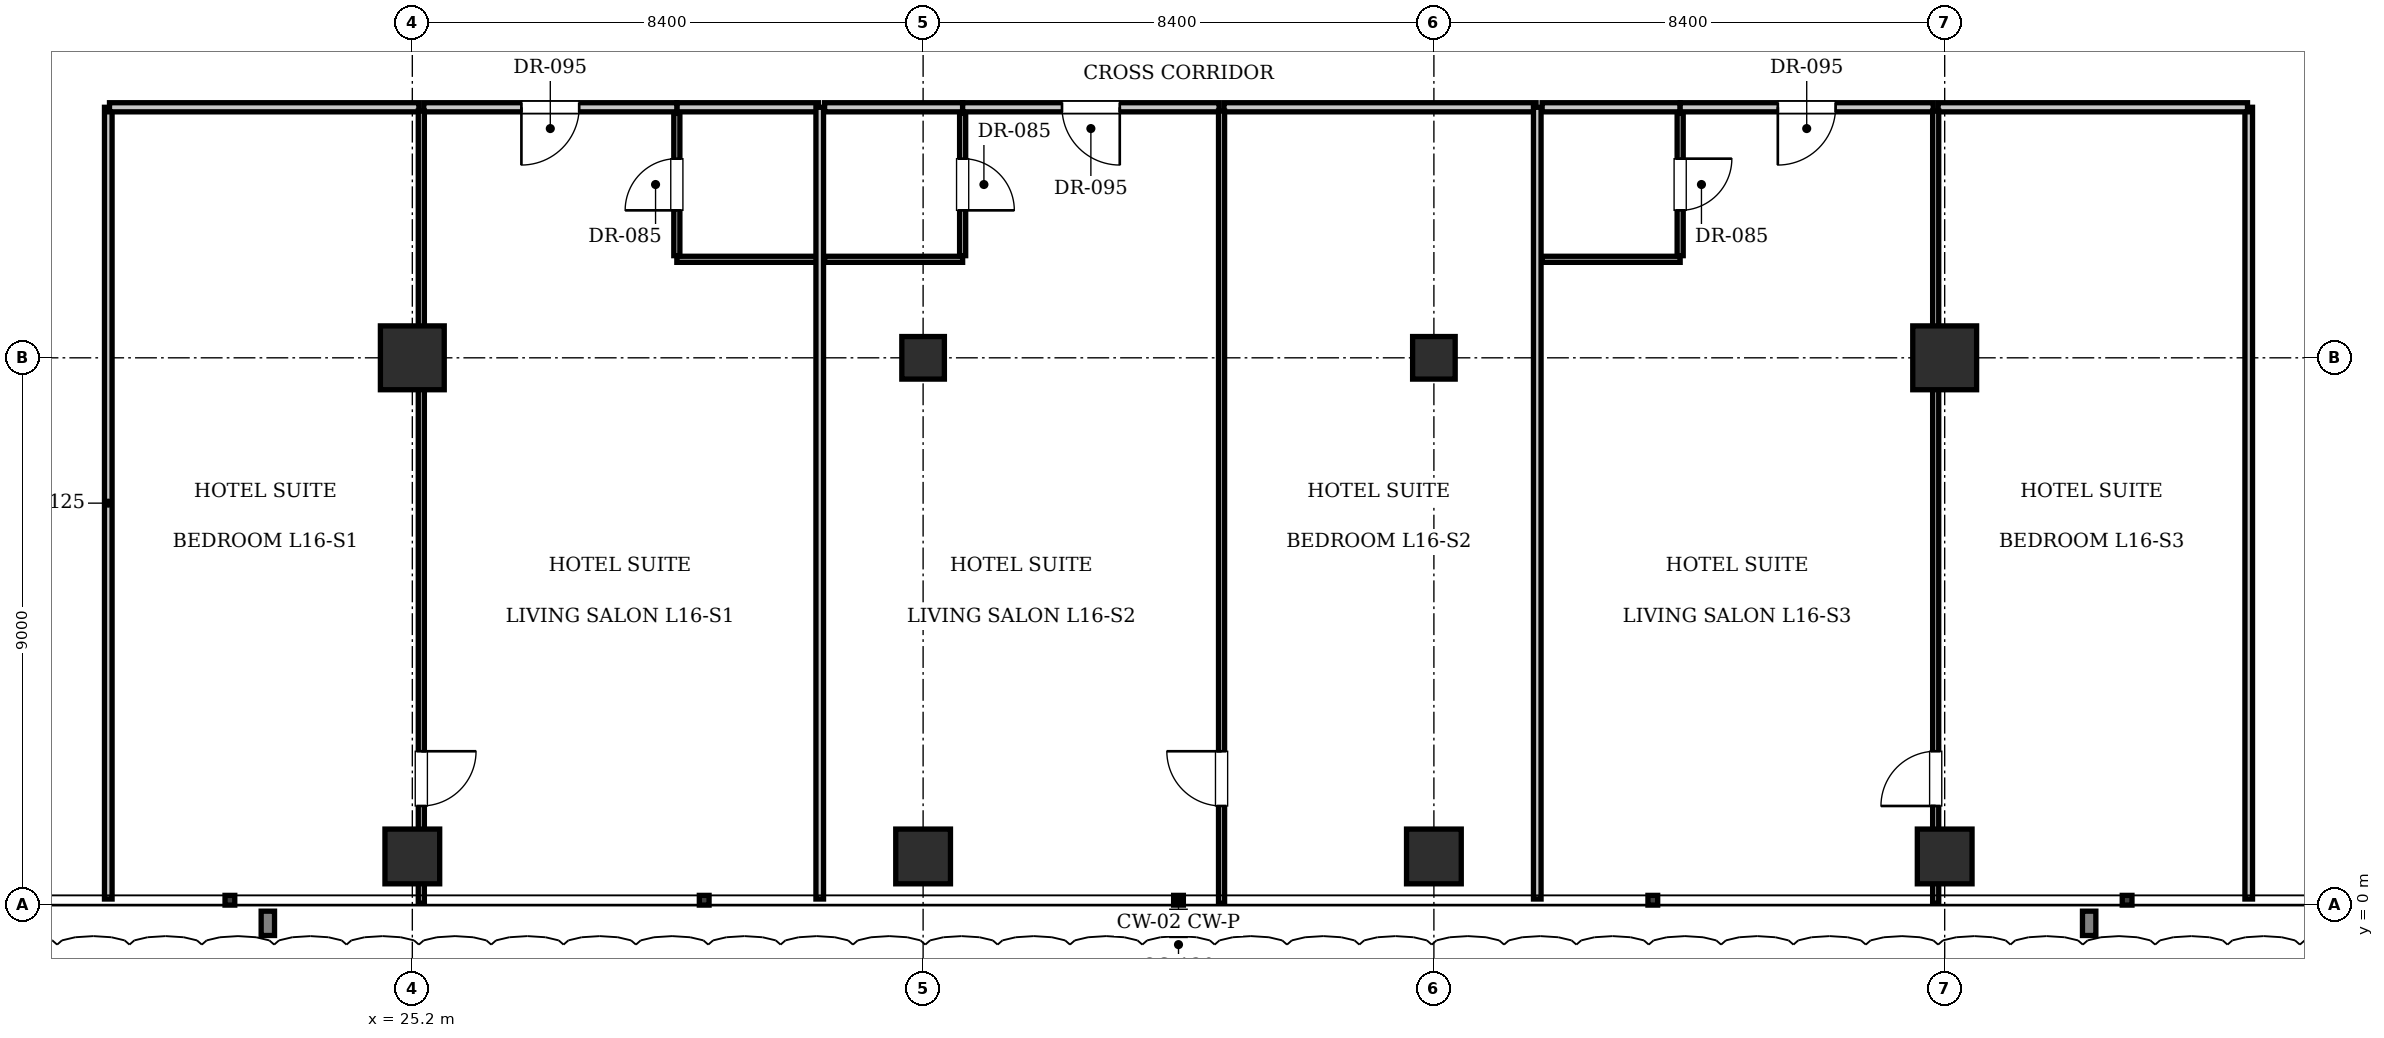
"""IFC4 building model, lengths in metres.
Left out: names, types, materials, properties, quantities, classifications, styles, units other than length and angle.
Written with IfcOpenShell. Run it as: python <this file> out.ifc"""

import sys

from ifc_helpers import new_model, si_unit, direction, frame, frame_2d, origin, origin_2d, place, context, subcontext, project, spatial, rectangle, i_section, extrude, element, fill, save


model = new_model("IFC4")
c1 = context("Model", 3, precision=1e-05, world=origin(), true_north=direction((0.0, 1.0)))
c2 = subcontext(c1, "Body", "Model", "MODEL_VIEW")
j1 = project(units=[si_unit("LENGTHUNIT", "METRE"), si_unit("PLANEANGLEUNIT", "RADIAN")], contexts=[c1])
p1 = place(None, origin())
s1 = spatial("IfcSite", under=j1, at=p1, CompositionType="ELEMENT")
p2 = place(p1, origin())
s2 = spatial("IfcBuilding", under=s1, at=p2, CompositionType="ELEMENT")
p3 = place(p2, frame((0.0, 0.0, 69.3)))
s3 = spatial("IfcBuildingStorey", under=s2, at=p3, CompositionType="ELEMENT", Elevation=69.3)
for number, where, z_axis, x_axis in (
    (1, (25.2, 9.0, 0.0), (0.0, 0.0, 1.0), (1.0, 0.0, 0.0)),
    (2, (50.4, 9.0, 0.0), (0.0, 0.0, 1.0), (1.0, 0.0, 0.0)),
):
    element("IfcColumn", number, at=place(p3, frame(where, z_axis=z_axis, x_axis=x_axis)), inside=s3, PredefinedType="COLUMN", context=c2, shape_type="SweptSolid", body=[
        extrude(rectangle(XDim=1.05, YDim=1.05, at=origin_2d()), origin(), (0.0, 0.0, 1.0), 3.85),
    ])
for number, where, z_axis, x_axis in (
    (3, (33.6, 9.0, 0.0), (0.0, 0.0, 1.0), (1.0, 0.0, 0.0)),
    (4, (42.0, 9.0, 0.0), (0.0, 0.0, 1.0), (1.0, 0.0, 0.0)),
):
    element("IfcColumn", number, at=place(p3, frame(where, z_axis=z_axis, x_axis=x_axis)), inside=s3, PredefinedType="COLUMN", context=c2, shape_type="SweptSolid", body=[
        extrude(i_section(OverallWidth=0.7, OverallDepth=0.7, WebThickness=0.028, FlangeThickness=0.044, at=origin_2d()), origin(), (0.0, 0.0, 1.0), 3.85),
    ])
for number, where, z_axis, x_axis in (
    (5, (25.2, 0.8, 0.0), (0.0, 0.0, 1.0), (1.0, 0.0, 0.0)),
    (6, (33.6, 0.8, 0.0), (0.0, 0.0, 1.0), (1.0, 0.0, 0.0)),
    (7, (42.0, 0.8, 0.0), (0.0, 0.0, 1.0), (1.0, 0.0, 0.0)),
    (8, (50.4, 0.8, 0.0), (0.0, 0.0, 1.0), (1.0, 0.0, 0.0)),
):
    element("IfcColumn", number, at=place(p3, frame(where, z_axis=z_axis, x_axis=x_axis)), inside=s3, PredefinedType="COLUMN", context=c2, shape_type="SweptSolid", body=[
        extrude(rectangle(XDim=0.9, YDim=0.9, at=origin_2d()), origin(), (0.0, 0.0, 1.0), 3.85),
    ])
for number, where, z_axis, x_axis in (
    (9, (20.2, 0.1, 0.0), (0.0, 0.0, 1.0), (0.0, 1.0, 0.0)),
    (10, (55.4, 0.1, 0.0), (0.0, 0.0, 1.0), (0.0, 1.0, 0.0)),
):
    element("IfcWall", number, at=place(p3, frame(where, z_axis=z_axis, x_axis=x_axis)), inside=s3, PredefinedType="PARTITIONING", context=c2, shape_type="SweptSolid", body=[
        extrude(rectangle(XDim=13.02, YDim=0.125, at=frame_2d((6.51, 0.0))), origin(), (0.0, 0.0, 1.0), 3.61),
    ])
p4 = place(p3, frame((29.55, 13.12, 0.0), z_axis=(0.0, 0.0, 1.0), x_axis=(1.0, 0.0, 0.0)))
e11 = element("IfcWall", 11, at=p4, inside=s3, PredefinedType="PARTITIONING", context=c2, shape_type="SweptSolid", body=[
    extrude(rectangle(XDim=2.33, YDim=0.15, at=frame_2d((1.165, 0.0))), origin(), (0.0, 0.0, 1.0), 3.61),
])
p5 = place(p3, frame((29.55, 10.62, 0.0), z_axis=(0.0, 0.0, 1.0), x_axis=(1.0, 0.0, 0.0)))
e12 = element("IfcWall", 12, at=p5, inside=s3, PredefinedType="PARTITIONING", context=c2, shape_type="SweptSolid", body=[
    extrude(rectangle(XDim=2.31, YDim=0.1, at=frame_2d((1.155, 0.0))), origin(), (0.0, 0.0, 1.0), 3.61),
])
p6 = place(p3, frame((29.55, 10.68, 0.0), z_axis=(0.0, 0.0, 1.0), x_axis=(0.0, 1.0, 0.0)))
e13 = element("IfcWall", 13, at=p6, inside=s3, PredefinedType="PARTITIONING", context=c2, shape_type="SweptSolid", body=[
    extrude(rectangle(XDim=2.34, YDim=0.1, at=frame_2d((1.17, 0.0))), origin(), (0.0, 0.0, 1.0), 3.61),
])
p7 = place(p6, frame((0.745, 0.0, 0.0)))
e14 = element("IfcOpeningElement", 14, at=p7, cuts=e13, PredefinedType="OPENING", context=c2, shape_type="SweptSolid", body=[
    extrude(rectangle(XDim=0.85, YDim=2.1, at=frame_2d((0.425, 1.05))), frame((0.0, 0.06, 0.0), z_axis=(0.0, -1.0, 0.0), x_axis=(1.0, 0.0, 0.0)), (0.0, 0.0, 1.0), 0.12),
])
p8 = place(p3, frame((20.22, 13.12, 0.0), z_axis=(0.0, 0.0, 1.0), x_axis=(1.0, 0.0, 0.0)))
e15 = element("IfcWall", 15, at=p8, inside=s3, PredefinedType="PARTITIONING", context=c2, shape_type="SweptSolid", body=[
    extrude(rectangle(XDim=5.088, YDim=0.15, at=frame_2d((2.544, 0.0))), origin(), (0.0, 0.0, 1.0), 3.61),
])
p9 = place(p3, frame((25.388, 13.12, 0.0), z_axis=(0.0, 0.0, 1.0), x_axis=(1.0, 0.0, 0.0)))
e16 = element("IfcWall", 16, at=p9, inside=s3, PredefinedType="PARTITIONING", context=c2, shape_type="SweptSolid", body=[
    extrude(rectangle(XDim=4.162, YDim=0.15, at=frame_2d((2.081, 0.0))), origin(), (0.0, 0.0, 1.0), 3.61),
])
p10 = place(p9, frame((1.606, 0.0, 0.0)))
e17 = element("IfcOpeningElement", 17, at=p10, cuts=e16, PredefinedType="OPENING", context=c2, shape_type="SweptSolid", body=[
    extrude(rectangle(XDim=0.95, YDim=2.15, at=frame_2d((0.475, 1.075))), frame((0.0, 0.085, 0.0), z_axis=(0.0, -1.0, 0.0), x_axis=(1.0, 0.0, 0.0)), (0.0, 0.0, 1.0), 0.17),
])
p11 = place(p3, frame((25.348, 0.03, 0.0), z_axis=(0.0, 0.0, 1.0), x_axis=(0.0, 1.0, 0.0)))
e18 = element("IfcWall", 18, at=p11, inside=s3, PredefinedType="PARTITIONING", context=c2, shape_type="SweptSolid", body=[
    extrude(rectangle(XDim=13.03, YDim=0.1, at=frame_2d((6.515, 0.0))), origin(), (0.0, 0.0, 1.0), 2.988),
])
p12 = place(p11, frame((1.6, 0.0, 0.0)))
e19 = element("IfcOpeningElement", 19, at=p12, cuts=e18, PredefinedType="OPENING", context=c2, shape_type="SweptSolid", body=[
    extrude(rectangle(XDim=0.9, YDim=2.1, at=frame_2d((0.45, 1.05))), frame((0.0, 0.06, 0.0), z_axis=(0.0, -1.0, 0.0), x_axis=(1.0, 0.0, 0.0)), (0.0, 0.0, 1.0), 0.12),
])
p13 = place(p3, frame((31.9, 0.1, 0.0), z_axis=(0.0, 0.0, 1.0), x_axis=(0.0, 1.0, 0.0)))
e20 = element("IfcWall", 20, at=p13, inside=s3, PredefinedType="PARTITIONING", context=c2, shape_type="SweptSolid", body=[
    extrude(rectangle(XDim=13.02, YDim=0.125, at=frame_2d((6.51, 0.0))), origin(), (0.0, 0.0, 1.0), 3.61),
])
p14 = place(p3, frame((31.98, 13.12, 0.0), z_axis=(0.0, 0.0, 1.0), x_axis=(1.0, 0.0, 0.0)))
e21 = element("IfcWall", 21, at=p14, inside=s3, PredefinedType="PARTITIONING", context=c2, shape_type="SweptSolid", body=[
    extrude(rectangle(XDim=2.27, YDim=0.15, at=frame_2d((1.135, 0.0))), origin(), (0.0, 0.0, 1.0), 3.61),
])
p15 = place(p3, frame((31.98, 10.62, 0.0), z_axis=(0.0, 0.0, 1.0), x_axis=(1.0, 0.0, 0.0)))
e22 = element("IfcWall", 22, at=p15, inside=s3, PredefinedType="PARTITIONING", context=c2, shape_type="SweptSolid", body=[
    extrude(rectangle(XDim=2.27, YDim=0.1, at=frame_2d((1.135, 0.0))), origin(), (0.0, 0.0, 1.0), 3.61),
])
p16 = place(p3, frame((34.25, 10.68, 0.0), z_axis=(0.0, 0.0, 1.0), x_axis=(0.0, 1.0, 0.0)))
e23 = element("IfcWall", 23, at=p16, inside=s3, PredefinedType="PARTITIONING", context=c2, shape_type="SweptSolid", body=[
    extrude(rectangle(XDim=2.34, YDim=0.1, at=frame_2d((1.17, 0.0))), origin(), (0.0, 0.0, 1.0), 3.61),
])
p17 = place(p16, frame((0.745, 0.0, 0.0)))
e24 = element("IfcOpeningElement", 24, at=p17, cuts=e23, PredefinedType="OPENING", context=c2, shape_type="SweptSolid", body=[
    extrude(rectangle(XDim=0.85, YDim=2.1, at=frame_2d((0.425, 1.05))), frame((0.0, 0.06, 0.0), z_axis=(0.0, -1.0, 0.0), x_axis=(1.0, 0.0, 0.0)), (0.0, 0.0, 1.0), 0.12),
])
p18 = place(p3, frame((34.25, 13.12, 0.0), z_axis=(0.0, 0.0, 1.0), x_axis=(1.0, 0.0, 0.0)))
e25 = element("IfcWall", 25, at=p18, inside=s3, PredefinedType="PARTITIONING", context=c2, shape_type="SweptSolid", body=[
    extrude(rectangle(XDim=4.218, YDim=0.15, at=frame_2d((2.109, 0.0))), origin(), (0.0, 0.0, 1.0), 3.61),
])
p19 = place(p18, frame((1.634, 0.0, 0.0)))
e26 = element("IfcOpeningElement", 26, at=p19, cuts=e25, PredefinedType="OPENING", context=c2, shape_type="SweptSolid", body=[
    extrude(rectangle(XDim=0.95, YDim=2.15, at=frame_2d((0.475, 1.075))), frame((0.0, 0.085, 0.0), z_axis=(0.0, -1.0, 0.0), x_axis=(1.0, 0.0, 0.0)), (0.0, 0.0, 1.0), 0.17),
])
p20 = place(p3, frame((38.548, 13.12, 0.0), z_axis=(0.0, 0.0, 1.0), x_axis=(1.0, 0.0, 0.0)))
e27 = element("IfcWall", 27, at=p20, inside=s3, PredefinedType="PARTITIONING", context=c2, shape_type="SweptSolid", body=[
    extrude(rectangle(XDim=5.132, YDim=0.15, at=frame_2d((2.566, 0.0))), origin(), (0.0, 0.0, 1.0), 3.61),
])
p21 = place(p3, frame((38.508, 0.03, 0.0), z_axis=(0.0, 0.0, 1.0), x_axis=(0.0, 1.0, 0.0)))
e28 = element("IfcWall", 28, at=p21, inside=s3, PredefinedType="PARTITIONING", context=c2, shape_type="SweptSolid", body=[
    extrude(rectangle(XDim=13.03, YDim=0.1, at=frame_2d((6.515, 0.0))), origin(), (0.0, 0.0, 1.0), 3.61),
])
p22 = place(p21, frame((1.6, 0.0, 0.0)))
e29 = element("IfcOpeningElement", 29, at=p22, cuts=e28, PredefinedType="OPENING", context=c2, shape_type="SweptSolid", body=[
    extrude(rectangle(XDim=0.9, YDim=2.1, at=frame_2d((0.45, 1.05))), frame((0.0, 0.06, 0.0), z_axis=(0.0, -1.0, 0.0), x_axis=(1.0, 0.0, 0.0)), (0.0, 0.0, 1.0), 0.12),
])
p23 = place(p3, frame((43.7, 0.1, 0.0), z_axis=(0.0, 0.0, 1.0), x_axis=(0.0, 1.0, 0.0)))
e30 = element("IfcWall", 30, at=p23, inside=s3, PredefinedType="PARTITIONING", context=c2, shape_type="SweptSolid", body=[
    extrude(rectangle(XDim=13.02, YDim=0.125, at=frame_2d((6.51, 0.0))), origin(), (0.0, 0.0, 1.0), 3.61),
])
p24 = place(p3, frame((43.78, 13.12, 0.0), z_axis=(0.0, 0.0, 1.0), x_axis=(1.0, 0.0, 0.0)))
e31 = element("IfcWall", 31, at=p24, inside=s3, PredefinedType="PARTITIONING", context=c2, shape_type="SweptSolid", body=[
    extrude(rectangle(XDim=2.27, YDim=0.15, at=frame_2d((1.135, 0.0))), origin(), (0.0, 0.0, 1.0), 3.61),
])
p25 = place(p3, frame((43.78, 10.62, 0.0), z_axis=(0.0, 0.0, 1.0), x_axis=(1.0, 0.0, 0.0)))
e32 = element("IfcWall", 32, at=p25, inside=s3, PredefinedType="PARTITIONING", context=c2, shape_type="SweptSolid", body=[
    extrude(rectangle(XDim=2.27, YDim=0.1, at=frame_2d((1.135, 0.0))), origin(), (0.0, 0.0, 1.0), 3.61),
])
p26 = place(p3, frame((46.05, 10.68, 0.0), z_axis=(0.0, 0.0, 1.0), x_axis=(0.0, 1.0, 0.0)))
e33 = element("IfcWall", 33, at=p26, inside=s3, PredefinedType="PARTITIONING", context=c2, shape_type="SweptSolid", body=[
    extrude(rectangle(XDim=2.34, YDim=0.1, at=frame_2d((1.17, 0.0))), origin(), (0.0, 0.0, 1.0), 3.61),
])
p27 = place(p26, frame((0.745, 0.0, 0.0)))
e34 = element("IfcOpeningElement", 34, at=p27, cuts=e33, PredefinedType="OPENING", context=c2, shape_type="SweptSolid", body=[
    extrude(rectangle(XDim=0.85, YDim=2.1, at=frame_2d((0.425, 1.05))), frame((0.0, 0.06, 0.0), z_axis=(0.0, -1.0, 0.0), x_axis=(1.0, 0.0, 0.0)), (0.0, 0.0, 1.0), 0.12),
])
p28 = place(p3, frame((46.05, 13.12, 0.0), z_axis=(0.0, 0.0, 1.0), x_axis=(1.0, 0.0, 0.0)))
e35 = element("IfcWall", 35, at=p28, inside=s3, PredefinedType="PARTITIONING", context=c2, shape_type="SweptSolid", body=[
    extrude(rectangle(XDim=4.162, YDim=0.15, at=frame_2d((2.081, 0.0))), origin(), (0.0, 0.0, 1.0), 3.61),
])
p29 = place(p28, frame((1.606, 0.0, 0.0)))
e36 = element("IfcOpeningElement", 36, at=p29, cuts=e35, PredefinedType="OPENING", context=c2, shape_type="SweptSolid", body=[
    extrude(rectangle(XDim=0.95, YDim=2.15, at=frame_2d((0.475, 1.075))), frame((0.0, 0.085, 0.0), z_axis=(0.0, -1.0, 0.0), x_axis=(1.0, 0.0, 0.0)), (0.0, 0.0, 1.0), 0.17),
])
p30 = place(p3, frame((50.292, 13.12, 0.0), z_axis=(0.0, 0.0, 1.0), x_axis=(1.0, 0.0, 0.0)))
e37 = element("IfcWall", 37, at=p30, inside=s3, PredefinedType="PARTITIONING", context=c2, shape_type="SweptSolid", body=[
    extrude(rectangle(XDim=5.088, YDim=0.15, at=frame_2d((2.544, 0.0))), origin(), (0.0, 0.0, 1.0), 3.61),
])
p31 = place(p3, frame((50.252, 0.03, 0.0), z_axis=(0.0, 0.0, 1.0), x_axis=(0.0, 1.0, 0.0)))
e38 = element("IfcWall", 38, at=p31, inside=s3, PredefinedType="PARTITIONING", context=c2, shape_type="SweptSolid", body=[
    extrude(rectangle(XDim=13.03, YDim=0.1, at=frame_2d((6.515, 0.0))), origin(), (0.0, 0.0, 1.0), 2.988),
])
p32 = place(p31, frame((1.6, 0.0, 0.0)))
e39 = element("IfcOpeningElement", 39, at=p32, cuts=e38, PredefinedType="OPENING", context=c2, shape_type="SweptSolid", body=[
    extrude(rectangle(XDim=0.9, YDim=2.1, at=frame_2d((0.45, 1.05))), frame((0.0, 0.06, 0.0), z_axis=(0.0, -1.0, 0.0), x_axis=(1.0, 0.0, 0.0)), (0.0, 0.0, 1.0), 0.12),
])
p33 = place(p7, origin())
e40 = element("IfcDoor", 40, at=p33, inside=s3, OperationType="SINGLE_SWING_LEFT", PredefinedType="DOOR", context=c2, shape_type="SweptSolid", body=[
    extrude(rectangle(XDim=0.85, YDim=2.1, at=frame_2d((0.425, 1.05))), frame((0.0, 0.025, 0.0), z_axis=(0.0, -1.0, 0.0), x_axis=(1.0, 0.0, 0.0)), (0.0, 0.0, 1.0), 0.05),
])
fill(e14, e40)
p34 = place(p10, frame((0.95, 0.0, 0.0), z_axis=(0.0, 0.0, 1.0), x_axis=(-1.0, 0.0, 0.0)))
e41 = element("IfcDoor", 41, at=p34, inside=s3, OperationType="SINGLE_SWING_RIGHT", PredefinedType="DOOR", context=c2, shape_type="SweptSolid", body=[
    extrude(rectangle(XDim=0.95, YDim=2.15, at=frame_2d((0.475, 1.075))), frame((0.0, 0.025, 0.0), z_axis=(0.0, -1.0, 0.0), x_axis=(1.0, 0.0, 0.0)), (0.0, 0.0, 1.0), 0.05),
])
fill(e17, e41)
p35 = place(p12, frame((0.9, 0.0, 0.0), z_axis=(0.0, 0.0, 1.0), x_axis=(-1.0, 0.0, 0.0)))
e42 = element("IfcDoor", 42, at=p35, inside=s3, OperationType="SINGLE_SWING_LEFT", PredefinedType="DOOR", context=c2, shape_type="SweptSolid", body=[
    extrude(rectangle(XDim=0.9, YDim=2.1, at=frame_2d((0.45, 1.05))), frame((0.0, 0.025, 0.0), z_axis=(0.0, -1.0, 0.0), x_axis=(1.0, 0.0, 0.0)), (0.0, 0.0, 1.0), 0.05),
])
fill(e19, e42)
p36 = place(p17, frame((0.85, 0.0, 0.0), z_axis=(0.0, 0.0, 1.0), x_axis=(-1.0, 0.0, 0.0)))
e43 = element("IfcDoor", 43, at=p36, inside=s3, OperationType="SINGLE_SWING_RIGHT", PredefinedType="DOOR", context=c2, shape_type="SweptSolid", body=[
    extrude(rectangle(XDim=0.85, YDim=2.1, at=frame_2d((0.425, 1.05))), frame((0.0, 0.025, 0.0), z_axis=(0.0, -1.0, 0.0), x_axis=(1.0, 0.0, 0.0)), (0.0, 0.0, 1.0), 0.05),
])
fill(e24, e43)
p37 = place(p19, frame((0.95, 0.0, 0.0), z_axis=(0.0, 0.0, 1.0), x_axis=(-1.0, 0.0, 0.0)))
e44 = element("IfcDoor", 44, at=p37, inside=s3, OperationType="SINGLE_SWING_LEFT", PredefinedType="DOOR", context=c2, shape_type="SweptSolid", body=[
    extrude(rectangle(XDim=0.95, YDim=2.15, at=frame_2d((0.475, 1.075))), frame((0.0, 0.025, 0.0), z_axis=(0.0, -1.0, 0.0), x_axis=(1.0, 0.0, 0.0)), (0.0, 0.0, 1.0), 0.05),
])
fill(e26, e44)
p38 = place(p22, origin())
e45 = element("IfcDoor", 45, at=p38, inside=s3, OperationType="SINGLE_SWING_RIGHT", PredefinedType="DOOR", context=c2, shape_type="SweptSolid", body=[
    extrude(rectangle(XDim=0.9, YDim=2.1, at=frame_2d((0.45, 1.05))), frame((0.0, 0.025, 0.0), z_axis=(0.0, -1.0, 0.0), x_axis=(1.0, 0.0, 0.0)), (0.0, 0.0, 1.0), 0.05),
])
fill(e29, e45)
p39 = place(p27, frame((0.85, 0.0, 0.0), z_axis=(0.0, 0.0, 1.0), x_axis=(-1.0, 0.0, 0.0)))
e46 = element("IfcDoor", 46, at=p39, inside=s3, OperationType="SINGLE_SWING_LEFT", PredefinedType="DOOR", context=c2, shape_type="SweptSolid", body=[
    extrude(rectangle(XDim=0.85, YDim=2.1, at=frame_2d((0.425, 1.05))), frame((0.0, 0.025, 0.0), z_axis=(0.0, -1.0, 0.0), x_axis=(1.0, 0.0, 0.0)), (0.0, 0.0, 1.0), 0.05),
])
fill(e34, e46)
p40 = place(p29, frame((0.95, 0.0, 0.0), z_axis=(0.0, 0.0, 1.0), x_axis=(-1.0, 0.0, 0.0)))
e47 = element("IfcDoor", 47, at=p40, inside=s3, OperationType="SINGLE_SWING_RIGHT", PredefinedType="DOOR", context=c2, shape_type="SweptSolid", body=[
    extrude(rectangle(XDim=0.95, YDim=2.15, at=frame_2d((0.475, 1.075))), frame((0.0, 0.025, 0.0), z_axis=(0.0, -1.0, 0.0), x_axis=(1.0, 0.0, 0.0)), (0.0, 0.0, 1.0), 0.05),
])
fill(e36, e47)
p41 = place(p32, origin())
e48 = element("IfcDoor", 48, at=p41, inside=s3, OperationType="SINGLE_SWING_LEFT", PredefinedType="DOOR", context=c2, shape_type="SweptSolid", body=[
    extrude(rectangle(XDim=0.9, YDim=2.1, at=frame_2d((0.45, 1.05))), frame((0.0, 0.025, 0.0), z_axis=(0.0, -1.0, 0.0), x_axis=(1.0, 0.0, 0.0)), (0.0, 0.0, 1.0), 0.05),
])
fill(e39, e48)
save(model, sys.argv[1])
